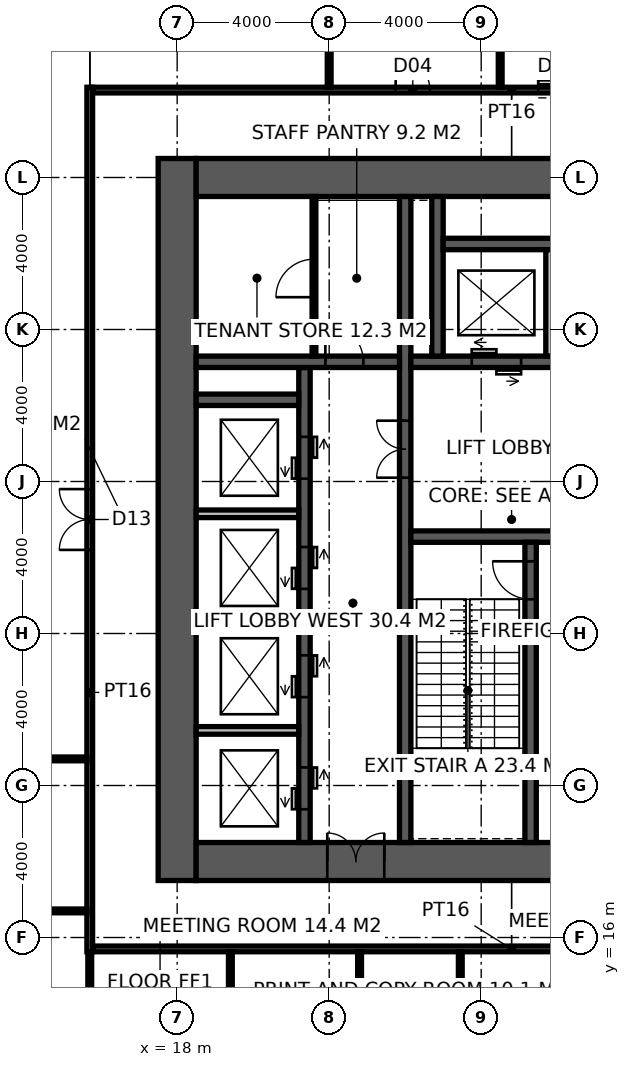
"""IFC4 building model, lengths in metres.
Left out: names, types, materials, properties, quantities, classifications, styles, units other than length and angle.
Written with IfcOpenShell. Run it as: python <this file> out.ifc"""

import sys

from ifc_helpers import new_model, si_unit, direction, frame, frame_2d, origin, place, context, subcontext, project, spatial, rectangle, extrude, element, fill, save


model = new_model("IFC4")
c1 = context("Model", 3, precision=1e-05, world=origin(), true_north=direction((0.0, 1.0)))
c2 = subcontext(c1, "Body", "Model", "MODEL_VIEW")
j1 = project(units=[si_unit("LENGTHUNIT", "METRE"), si_unit("PLANEANGLEUNIT", "RADIAN")], contexts=[c1])
p1 = place(None, origin())
s1 = spatial("IfcSite", under=j1, at=p1, CompositionType="ELEMENT")
p2 = place(p1, origin())
s2 = spatial("IfcBuilding", under=s1, at=p2, CompositionType="ELEMENT")
p3 = place(p2, frame((0.0, 0.0, 142.8)))
s3 = spatial("IfcBuildingStorey", under=s2, at=p3, CompositionType="ELEMENT", Elevation=142.8)
p4 = place(p3, frame((18.0, 17.5, -0.15), z_axis=(0.0, 0.0, 1.0), x_axis=(0.0, 1.0, 0.0)))
e1 = element("IfcWall", 1, at=p4, inside=s3, PredefinedType="SHEAR", context=c2, shape_type="SweptSolid", body=[
    extrude(rectangle(XDim=19.0, YDim=1.0, at=frame_2d((9.5, 0.0))), origin(), (0.0, 0.0, 1.0), 5.0),
])
p5 = place(p3, frame((18.5, 18.0, -0.15), z_axis=(0.0, 0.0, 1.0), x_axis=(1.0, 0.0, 0.0)))
e2 = element("IfcWall", 2, at=p5, inside=s3, PredefinedType="SHEAR", context=c2, shape_type="SweptSolid", body=[
    extrude(rectangle(XDim=17.6, YDim=1.0, at=frame_2d((8.8, 0.0))), origin(), (0.0, 0.0, 1.0), 5.0),
])
p6 = place(p5, frame((3.45, 0.0, 0.15)))
e3 = element("IfcOpeningElement", 3, at=p6, cuts=e2, PredefinedType="OPENING", context=c2, shape_type="SweptSolid", body=[
    extrude(rectangle(XDim=1.5, YDim=2.4, at=frame_2d((0.75, 1.2))), frame((0.0, 0.51, 0.0), z_axis=(0.0, -1.0, 0.0), x_axis=(1.0, 0.0, 0.0)), (0.0, 0.0, 1.0), 1.02),
])
p7 = place(p3, frame((18.5, 36.0, -0.15), z_axis=(0.0, 0.0, 1.0), x_axis=(1.0, 0.0, 0.0)))
e4 = element("IfcWall", 4, at=p7, inside=s3, PredefinedType="SHEAR", context=c2, shape_type="SweptSolid", body=[
    extrude(rectangle(XDim=17.6, YDim=1.0, at=frame_2d((8.8, 0.0))), origin(), (0.0, 0.0, 1.0), 5.0),
])
p8 = place(p3, frame((24.0, 18.5, -0.15), z_axis=(0.0, 0.0, 1.0), x_axis=(0.0, 1.0, 0.0)))
e5 = element("IfcWall", 5, at=p8, inside=s3, PredefinedType="SHEAR", context=c2, shape_type="SweptSolid", body=[
    extrude(rectangle(XDim=17.0, YDim=0.3, at=frame_2d((8.5, 0.0))), origin(), (0.0, 0.0, 1.0), 5.0),
])
p9 = place(p8, frame((9.6, 0.0, 0.15)))
e6 = element("IfcOpeningElement", 6, at=p9, cuts=e5, PredefinedType="OPENING", context=c2, shape_type="SweptSolid", body=[
    extrude(rectangle(XDim=1.5, YDim=2.4, at=frame_2d((0.75, 1.2))), frame((0.0, 0.16, 0.0), z_axis=(0.0, -1.0, 0.0), x_axis=(1.0, 0.0, 0.0)), (0.0, 0.0, 1.0), 0.32),
])
p10 = place(p3, frame((24.15, 26.55, -0.15), z_axis=(0.0, 0.0, 1.0), x_axis=(1.0, 0.0, 0.0)))
e7 = element("IfcWall", 7, at=p10, inside=s3, PredefinedType="SHEAR", context=c2, shape_type="SweptSolid", body=[
    extrude(rectangle(XDim=11.25, YDim=0.3, at=frame_2d((5.625, 0.0))), origin(), (0.0, 0.0, 1.0), 5.0),
])
p11 = place(p10, frame((9.25, 0.0, 0.15)))
e8 = element("IfcOpeningElement", 8, at=p11, cuts=e7, PredefinedType="OPENING", context=c2, shape_type="SweptSolid", body=[
    extrude(rectangle(XDim=1.0, YDim=2.2, at=frame_2d((0.5, 1.1))), frame((0.0, 0.16, 0.0), z_axis=(0.0, -1.0, 0.0), x_axis=(1.0, 0.0, 0.0)), (0.0, 0.0, 1.0), 0.32),
])
p12 = place(p10, frame((4.9, 0.0, 0.15)))
e9 = element("IfcOpeningElement", 9, at=p12, cuts=e7, PredefinedType="OPENING", context=c2, shape_type="SweptSolid", body=[
    extrude(rectangle(XDim=1.5, YDim=2.4, at=frame_2d((0.75, 1.2))), frame((0.0, 0.16, 0.0), z_axis=(0.0, -1.0, 0.0), x_axis=(1.0, 0.0, 0.0)), (0.0, 0.0, 1.0), 0.32),
])
p13 = place(p3, frame((27.3, 18.5, -0.15), z_axis=(0.0, 0.0, 1.0), x_axis=(0.0, 1.0, 0.0)))
e10 = element("IfcWall", 10, at=p13, inside=s3, PredefinedType="SHEAR", context=c2, shape_type="SweptSolid", body=[
    extrude(rectangle(XDim=7.9, YDim=0.3, at=frame_2d((3.95, 0.0))), origin(), (0.0, 0.0, 1.0), 5.0),
])
p14 = place(p13, frame((6.4, 0.0, 0.15)))
e11 = element("IfcOpeningElement", 11, at=p14, cuts=e10, PredefinedType="OPENING", context=c2, shape_type="SweptSolid", body=[
    extrude(rectangle(XDim=1.0, YDim=2.2, at=frame_2d((0.5, 1.1))), frame((0.0, 0.16, 0.0), z_axis=(0.0, -1.0, 0.0), x_axis=(1.0, 0.0, 0.0)), (0.0, 0.0, 1.0), 0.32),
])
p15 = place(p3, frame((24.15, 31.15, -0.15), z_axis=(0.0, 0.0, 1.0), x_axis=(1.0, 0.0, 0.0)))
e12 = element("IfcWall", 12, at=p15, inside=s3, PredefinedType="SHEAR", context=c2, shape_type="SweptSolid", body=[
    extrude(rectangle(XDim=11.25, YDim=0.3, at=frame_2d((5.625, 0.0))), origin(), (0.0, 0.0, 1.0), 5.0),
])
p16 = place(p15, frame((1.6, 0.0, 0.15)))
e13 = element("IfcOpeningElement", 13, at=p16, cuts=e12, PredefinedType="OPENING", context=c2, shape_type="SweptSolid", body=[
    extrude(rectangle(XDim=1.3, YDim=2.4, at=frame_2d((0.65, 1.2))), frame((0.0, 0.16, 0.0), z_axis=(0.0, -1.0, 0.0), x_axis=(1.0, 0.0, 0.0)), (0.0, 0.0, 1.0), 0.32),
])
p17 = place(p15, frame((4.4, 0.0, 0.15)))
e14 = element("IfcOpeningElement", 14, at=p17, cuts=e12, PredefinedType="OPENING", context=c2, shape_type="SweptSolid", body=[
    extrude(rectangle(XDim=1.3, YDim=2.4, at=frame_2d((0.65, 1.2))), frame((0.0, 0.16, 0.0), z_axis=(0.0, -1.0, 0.0), x_axis=(1.0, 0.0, 0.0)), (0.0, 0.0, 1.0), 0.32),
])
p18 = place(p15, frame((7.25, 0.0, 0.15)))
e15 = element("IfcOpeningElement", 15, at=p18, cuts=e12, PredefinedType="OPENING", context=c2, shape_type="SweptSolid", body=[
    extrude(rectangle(XDim=1.4, YDim=2.4, at=frame_2d((0.7, 1.2))), frame((0.0, 0.16, 0.0), z_axis=(0.0, -1.0, 0.0), x_axis=(1.0, 0.0, 0.0)), (0.0, 0.0, 1.0), 0.32),
])
p19 = place(p3, frame((21.35, 18.5, -0.15), z_axis=(0.0, 0.0, 1.0), x_axis=(0.0, 1.0, 0.0)))
e16 = element("IfcWall", 16, at=p19, inside=s3, PredefinedType="SHEAR", context=c2, shape_type="SweptSolid", body=[
    extrude(rectangle(XDim=12.5, YDim=0.3, at=frame_2d((6.25, 0.0))), origin(), (0.0, 0.0, 1.0), 5.0),
])
p20 = place(p19, frame((0.875, 0.0, 0.15)))
e17 = element("IfcOpeningElement", 17, at=p20, cuts=e16, PredefinedType="OPENING", context=c2, shape_type="SweptSolid", body=[
    extrude(rectangle(XDim=1.1, YDim=2.2, at=frame_2d((0.55, 1.1))), frame((0.0, 0.16, 0.0), z_axis=(0.0, -1.0, 0.0), x_axis=(1.0, 0.0, 0.0)), (0.0, 0.0, 1.0), 0.32),
])
p21 = place(p19, frame((3.825, 0.0, 0.15)))
e18 = element("IfcOpeningElement", 18, at=p21, cuts=e16, PredefinedType="OPENING", context=c2, shape_type="SweptSolid", body=[
    extrude(rectangle(XDim=1.1, YDim=2.2, at=frame_2d((0.55, 1.1))), frame((0.0, 0.16, 0.0), z_axis=(0.0, -1.0, 0.0), x_axis=(1.0, 0.0, 0.0)), (0.0, 0.0, 1.0), 0.32),
])
p22 = place(p19, frame((6.675, 0.0, 0.15)))
e19 = element("IfcOpeningElement", 19, at=p22, cuts=e16, PredefinedType="OPENING", context=c2, shape_type="SweptSolid", body=[
    extrude(rectangle(XDim=1.1, YDim=2.2, at=frame_2d((0.55, 1.1))), frame((0.0, 0.16, 0.0), z_axis=(0.0, -1.0, 0.0), x_axis=(1.0, 0.0, 0.0)), (0.0, 0.0, 1.0), 0.32),
])
p23 = place(p19, frame((9.575, 0.0, 0.15)))
e20 = element("IfcOpeningElement", 20, at=p23, cuts=e16, PredefinedType="OPENING", context=c2, shape_type="SweptSolid", body=[
    extrude(rectangle(XDim=1.1, YDim=2.2, at=frame_2d((0.55, 1.1))), frame((0.0, 0.16, 0.0), z_axis=(0.0, -1.0, 0.0), x_axis=(1.0, 0.0, 0.0)), (0.0, 0.0, 1.0), 0.32),
])
p24 = place(p3, frame((18.5, 31.15, -0.15), z_axis=(0.0, 0.0, 1.0), x_axis=(1.0, 0.0, 0.0)))
e21 = element("IfcWall", 21, at=p24, inside=s3, PredefinedType="SHEAR", context=c2, shape_type="SweptSolid", body=[
    extrude(rectangle(XDim=5.35, YDim=0.3, at=frame_2d((2.675, 0.0))), origin(), (0.0, 0.0, 1.0), 5.0),
])
p25 = place(p24, frame((3.4, 0.0, 0.15)))
e22 = element("IfcOpeningElement", 22, at=p25, cuts=e21, PredefinedType="OPENING", context=c2, shape_type="SweptSolid", body=[
    extrude(rectangle(XDim=1.0, YDim=2.2, at=frame_2d((0.5, 1.1))), frame((0.0, 0.16, 0.0), z_axis=(0.0, -1.0, 0.0), x_axis=(1.0, 0.0, 0.0)), (0.0, 0.0, 1.0), 0.32),
])
p26 = place(p3, frame((18.5, 30.15, -0.15), z_axis=(0.0, 0.0, 1.0), x_axis=(1.0, 0.0, 0.0)))
e23 = element("IfcWall", 23, at=p26, inside=s3, PredefinedType="SHEAR", context=c2, shape_type="SweptSolid", body=[
    extrude(rectangle(XDim=2.7, YDim=0.3, at=frame_2d((1.35, 0.0))), origin(), (0.0, 0.0, 1.0), 5.0),
])
p27 = place(p3, frame((24.85, 31.3, -0.15), z_axis=(0.0, 0.0, 1.0), x_axis=(0.0, 1.0, 0.0)))
e24 = element("IfcWall", 24, at=p27, inside=s3, PredefinedType="SHEAR", context=c2, shape_type="SweptSolid", body=[
    extrude(rectangle(XDim=4.2, YDim=0.3, at=frame_2d((2.1, 0.0))), origin(), (0.0, 0.0, 1.0), 5.0),
])
p28 = place(p3, frame((25.0, 34.25, -0.15), z_axis=(0.0, 0.0, 1.0), x_axis=(1.0, 0.0, 0.0)))
e25 = element("IfcWall", 25, at=p28, inside=s3, PredefinedType="SHEAR", context=c2, shape_type="SweptSolid", body=[
    extrude(rectangle(XDim=8.6, YDim=0.3, at=frame_2d((4.3, 0.0))), origin(), (0.0, 0.0, 1.0), 5.0),
])
p29 = place(p3, frame((27.8, 31.3, -0.15), z_axis=(0.0, 0.0, 1.0), x_axis=(0.0, 1.0, 0.0)))
e26 = element("IfcWall", 26, at=p29, inside=s3, PredefinedType="SOLIDWALL", context=c2, shape_type="SweptSolid", body=[
    extrude(rectangle(XDim=2.8, YDim=0.2, at=frame_2d((1.4, 0.0))), origin(), (0.0, 0.0, 1.0), 5.0),
])
for number, where, z_axis, x_axis in (
    (27, (18.5, 21.45, -0.15), (0.0, 0.0, 1.0), (1.0, 0.0, 0.0)),
    (28, (18.5, 24.3, -0.15), (0.0, 0.0, 1.0), (1.0, 0.0, 0.0)),
    (29, (18.5, 27.15, -0.15), (0.0, 0.0, 1.0), (1.0, 0.0, 0.0)),
):
    element("IfcWall", number, at=place(p3, frame(where, z_axis=z_axis, x_axis=x_axis)), inside=s3, PredefinedType="SOLIDWALL", context=c2, shape_type="SweptSolid", body=[
        extrude(rectangle(XDim=2.7, YDim=0.2, at=frame_2d((1.35, 0.0))), origin(), (0.0, 0.0, 1.0), 5.0),
    ])
p30 = place(p3, frame((21.6, 31.3, 0.0), z_axis=(0.0, 0.0, 1.0), x_axis=(0.0, 1.0, 0.0)))
e30 = element("IfcWall", 30, at=p30, inside=s3, PredefinedType="PARTITIONING", context=c2, shape_type="SweptSolid", body=[
    extrude(rectangle(XDim=4.2, YDim=0.1, at=frame_2d((2.1, 0.0))), origin(), (0.0, 0.0, 1.0), 4.85),
])
p31 = place(p30, frame((1.55, 0.0, 0.0)))
e31 = element("IfcOpeningElement", 31, at=p31, cuts=e30, PredefinedType="OPENING", context=c2, shape_type="SweptSolid", body=[
    extrude(rectangle(XDim=1.0, YDim=2.2, at=frame_2d((0.5, 1.1))), frame((0.0, 0.06, 0.0), z_axis=(0.0, -1.0, 0.0), x_axis=(1.0, 0.0, 0.0)), (0.0, 0.0, 1.0), 0.12),
])
p32 = place(p3, frame((15.7, 15.625, 0.0), z_axis=(0.0, 0.0, 1.0), x_axis=(0.0, 1.0, 0.0)))
e32 = element("IfcWall", 32, at=p32, inside=s3, PredefinedType="PARTITIONING", context=c2, shape_type="SweptSolid", body=[
    extrude(rectangle(XDim=22.75, YDim=0.15, at=frame_2d((11.375, 0.0))), origin(), (0.0, 0.0, 1.0), 4.85),
])
p33 = place(p32, frame((10.575, 0.0, 0.0)))
e33 = element("IfcOpeningElement", 33, at=p33, cuts=e32, PredefinedType="OPENING", context=c2, shape_type="SweptSolid", body=[
    extrude(rectangle(XDim=1.6, YDim=2.7, at=frame_2d((0.8, 1.35))), frame((0.0, 0.085, 0.0), z_axis=(0.0, -1.0, 0.0), x_axis=(1.0, 0.0, 0.0)), (0.0, 0.0, 1.0), 0.17),
])
p34 = place(p3, frame((15.775, 15.7, 0.0), z_axis=(0.0, 0.0, 1.0), x_axis=(1.0, 0.0, 0.0)))
e34 = element("IfcWall", 34, at=p34, inside=s3, PredefinedType="PARTITIONING", context=c2, shape_type="SweptSolid", body=[
    extrude(rectangle(XDim=22.05, YDim=0.15, at=frame_2d((11.025, 0.0))), origin(), (0.0, 0.0, 1.0), 4.85),
])
p35 = place(p3, frame((15.775, 38.3, 0.0), z_axis=(0.0, 0.0, 1.0), x_axis=(1.0, 0.0, 0.0)))
e35 = element("IfcWall", 35, at=p35, inside=s3, PredefinedType="PARTITIONING", context=c2, shape_type="SweptSolid", body=[
    extrude(rectangle(XDim=22.05, YDim=0.15, at=frame_2d((11.025, 0.0))), origin(), (0.0, 0.0, 1.0), 4.85),
])
p36 = place(p35, frame((7.975, 0.0, 0.0)))
e36 = element("IfcOpeningElement", 36, at=p36, cuts=e35, PredefinedType="OPENING", context=c2, shape_type="SweptSolid", body=[
    extrude(rectangle(XDim=0.9, YDim=2.1, at=frame_2d((0.45, 1.05))), frame((0.0, 0.085, 0.0), z_axis=(0.0, -1.0, 0.0), x_axis=(1.0, 0.0, 0.0)), (0.0, 0.0, 1.0), 0.17),
])
p37 = place(p35, frame((11.725, 0.0, 0.0)))
e37 = element("IfcOpeningElement", 37, at=p37, cuts=e35, PredefinedType="OPENING", context=c2, shape_type="SweptSolid", body=[
    extrude(rectangle(XDim=1.0, YDim=2.1, at=frame_2d((0.5, 1.05))), frame((0.0, 0.085, 0.0), z_axis=(0.0, -1.0, 0.0), x_axis=(1.0, 0.0, 0.0)), (0.0, 0.0, 1.0), 0.17),
])
p38 = place(p35, frame((15.575, 0.0, 0.0)))
e38 = element("IfcOpeningElement", 38, at=p38, cuts=e35, PredefinedType="OPENING", context=c2, shape_type="SweptSolid", body=[
    extrude(rectangle(XDim=0.9, YDim=2.1, at=frame_2d((0.45, 1.05))), frame((0.0, 0.085, 0.0), z_axis=(0.0, -1.0, 0.0), x_axis=(1.0, 0.0, 0.0)), (0.0, 0.0, 1.0), 0.17),
])
p39 = place(p3, frame((22.0, 38.375, 0.0), z_axis=(0.0, 0.0, 1.0), x_axis=(0.0, 1.0, 0.0)))
e39 = element("IfcWall", 39, at=p39, inside=s3, PredefinedType="PARTITIONING", context=c2, shape_type="SweptSolid", body=[
    extrude(rectangle(XDim=3.675, YDim=0.1, at=frame_2d((1.837, 0.0))), origin(), (0.0, 0.0, 1.0), 3.95),
])
p40 = place(p3, frame((26.5, 38.375, 0.0), z_axis=(0.0, 0.0, 1.0), x_axis=(0.0, 1.0, 0.0)))
e40 = element("IfcWall", 40, at=p40, inside=s3, PredefinedType="PARTITIONING", context=c2, shape_type="SweptSolid", body=[
    extrude(rectangle(XDim=3.575, YDim=0.1, at=frame_2d((1.788, 0.0))), origin(), (0.0, 0.0, 1.0), 4.85),
])
for number, where, z_axis, x_axis in (
    (41, (10.25, 16.7, 0.0), (0.0, 0.0, 1.0), (1.0, 0.0, 0.0)),
    (42, (10.25, 20.7, 0.0), (0.0, 0.0, 1.0), (1.0, 0.0, 0.0)),
):
    element("IfcWall", number, at=place(p3, frame(where, z_axis=z_axis, x_axis=x_axis)), inside=s3, PredefinedType="PARTITIONING", context=c2, shape_type="SweptSolid", body=[
        extrude(rectangle(XDim=5.375, YDim=0.1, at=frame_2d((2.688, 0.0))), origin(), (0.0, 0.0, 1.0), 4.85),
    ])
for number, where, z_axis, x_axis in (
    (43, (15.7, 11.55, 0.0), (0.0, 0.0, 1.0), (0.0, 1.0, 0.0)),
    (44, (19.4, 11.55, 0.0), (0.0, 0.0, 1.0), (0.0, 1.0, 0.0)),
    (45, (22.8, 11.55, 0.0), (0.0, 0.0, 1.0), (0.0, 1.0, 0.0)),
    (46, (25.45, 11.55, 0.0), (0.0, 0.0, 1.0), (0.0, 1.0, 0.0)),
):
    element("IfcWall", number, at=place(p3, frame(where, z_axis=z_axis, x_axis=x_axis)), inside=s3, PredefinedType="PARTITIONING", context=c2, shape_type="SweptSolid", body=[
        extrude(rectangle(XDim=4.075, YDim=0.1, at=frame_2d((2.038, 0.0))), origin(), (0.0, 0.0, 1.0), 4.85),
    ])
p41 = place(p14, origin())
e47 = element("IfcDoor", 47, at=p41, inside=s3, OperationType="SINGLE_SWING_RIGHT", PredefinedType="DOOR", context=c2, shape_type="SweptSolid", body=[
    extrude(rectangle(XDim=1.0, YDim=2.2, at=frame_2d((0.5, 1.1))), frame((0.0, 0.025, 0.0), z_axis=(0.0, -1.0, 0.0), x_axis=(1.0, 0.0, 0.0)), (0.0, 0.0, 1.0), 0.05),
])
fill(e11, e47)
p42 = place(p9, origin())
e48 = element("IfcDoor", 48, at=p42, inside=s3, OperationType="DOUBLE_DOOR_DOUBLE_SWING", PredefinedType="DOOR", context=c2, shape_type="SweptSolid", body=[
    extrude(rectangle(XDim=1.5, YDim=2.4, at=frame_2d((0.75, 1.2))), frame((0.0, 0.025, 0.0), z_axis=(0.0, -1.0, 0.0), x_axis=(1.0, 0.0, 0.0)), (0.0, 0.0, 1.0), 0.05),
])
fill(e6, e48)
p43 = place(p25, origin())
e49 = element("IfcDoor", 49, at=p43, inside=s3, OperationType="SINGLE_SWING_LEFT", PredefinedType="DOOR", context=c2, shape_type="SweptSolid", body=[
    extrude(rectangle(XDim=1.0, YDim=2.2, at=frame_2d((0.5, 1.1))), frame((0.0, 0.025, 0.0), z_axis=(0.0, -1.0, 0.0), x_axis=(1.0, 0.0, 0.0)), (0.0, 0.0, 1.0), 0.05),
])
fill(e22, e49)
p44 = place(p31, origin())
e50 = element("IfcDoor", 50, at=p44, inside=s3, OperationType="SINGLE_SWING_LEFT", PredefinedType="DOOR", context=c2, shape_type="SweptSolid", body=[
    extrude(rectangle(XDim=1.0, YDim=2.2, at=frame_2d((0.5, 1.1))), frame((0.0, 0.025, 0.0), z_axis=(0.0, -1.0, 0.0), x_axis=(1.0, 0.0, 0.0)), (0.0, 0.0, 1.0), 0.05),
])
fill(e31, e50)
p45 = place(p6, origin())
e51 = element("IfcDoor", 51, at=p45, inside=s3, OperationType="DOUBLE_DOOR_DOUBLE_SWING", PredefinedType="DOOR", context=c2, shape_type="SweptSolid", body=[
    extrude(rectangle(XDim=1.5, YDim=2.4, at=frame_2d((0.75, 1.2))), frame((0.0, 0.025, 0.0), z_axis=(0.0, -1.0, 0.0), x_axis=(1.0, 0.0, 0.0)), (0.0, 0.0, 1.0), 0.05),
])
fill(e3, e51)
p46 = place(p36, origin())
e52 = element("IfcDoor", 52, at=p46, inside=s3, OperationType="SINGLE_SWING_LEFT", PredefinedType="DOOR", context=c2, shape_type="SweptSolid", body=[
    extrude(rectangle(XDim=0.9, YDim=2.1, at=frame_2d((0.45, 1.05))), frame((0.0, 0.025, 0.0), z_axis=(0.0, -1.0, 0.0), x_axis=(1.0, 0.0, 0.0)), (0.0, 0.0, 1.0), 0.05),
])
fill(e36, e52)
p47 = place(p37, origin())
e53 = element("IfcDoor", 53, at=p47, inside=s3, OperationType="SLIDING_TO_LEFT", PredefinedType="DOOR", context=c2, shape_type="SweptSolid", body=[
    extrude(rectangle(XDim=1.0, YDim=2.1, at=frame_2d((0.5, 1.05))), frame((0.0, 0.025, 0.0), z_axis=(0.0, -1.0, 0.0), x_axis=(1.0, 0.0, 0.0)), (0.0, 0.0, 1.0), 0.05),
])
fill(e37, e53)
p48 = place(p33, origin())
e54 = element("IfcDoor", 54, at=p48, inside=s3, OperationType="DOUBLE_DOOR_DOUBLE_SWING", PredefinedType="DOOR", context=c2, shape_type="SweptSolid", body=[
    extrude(rectangle(XDim=1.6, YDim=2.7, at=frame_2d((0.8, 1.35))), frame((0.0, 0.025, 0.0), z_axis=(0.0, -1.0, 0.0), x_axis=(1.0, 0.0, 0.0)), (0.0, 0.0, 1.0), 0.05),
])
fill(e33, e54)
p49 = place(p16, origin())
e55 = element("IfcDoor", 55, at=p49, inside=s3, OperationType="DOUBLE_DOOR_SLIDING", PredefinedType="DOOR", context=c2, shape_type="SweptSolid", body=[
    extrude(rectangle(XDim=1.3, YDim=2.4, at=frame_2d((0.65, 1.2))), frame((0.0, 0.025, 0.0), z_axis=(0.0, -1.0, 0.0), x_axis=(1.0, 0.0, 0.0)), (0.0, 0.0, 1.0), 0.05),
])
fill(e13, e55)
p50 = place(p20, origin())
e56 = element("IfcDoor", 56, at=p50, inside=s3, OperationType="DOUBLE_DOOR_SLIDING", PredefinedType="DOOR", context=c2, shape_type="SweptSolid", body=[
    extrude(rectangle(XDim=1.1, YDim=2.2, at=frame_2d((0.55, 1.1))), frame((0.0, 0.025, 0.0), z_axis=(0.0, -1.0, 0.0), x_axis=(1.0, 0.0, 0.0)), (0.0, 0.0, 1.0), 0.05),
])
fill(e17, e56)
p51 = place(p21, origin())
e57 = element("IfcDoor", 57, at=p51, inside=s3, OperationType="DOUBLE_DOOR_SLIDING", PredefinedType="DOOR", context=c2, shape_type="SweptSolid", body=[
    extrude(rectangle(XDim=1.1, YDim=2.2, at=frame_2d((0.55, 1.1))), frame((0.0, 0.025, 0.0), z_axis=(0.0, -1.0, 0.0), x_axis=(1.0, 0.0, 0.0)), (0.0, 0.0, 1.0), 0.05),
])
fill(e18, e57)
p52 = place(p22, origin())
e58 = element("IfcDoor", 58, at=p52, inside=s3, OperationType="DOUBLE_DOOR_SLIDING", PredefinedType="DOOR", context=c2, shape_type="SweptSolid", body=[
    extrude(rectangle(XDim=1.1, YDim=2.2, at=frame_2d((0.55, 1.1))), frame((0.0, 0.025, 0.0), z_axis=(0.0, -1.0, 0.0), x_axis=(1.0, 0.0, 0.0)), (0.0, 0.0, 1.0), 0.05),
])
fill(e19, e58)
p53 = place(p23, origin())
e59 = element("IfcDoor", 59, at=p53, inside=s3, OperationType="DOUBLE_DOOR_SLIDING", PredefinedType="DOOR", context=c2, shape_type="SweptSolid", body=[
    extrude(rectangle(XDim=1.1, YDim=2.2, at=frame_2d((0.55, 1.1))), frame((0.0, 0.025, 0.0), z_axis=(0.0, -1.0, 0.0), x_axis=(1.0, 0.0, 0.0)), (0.0, 0.0, 1.0), 0.05),
])
fill(e20, e59)
save(model, sys.argv[1])
